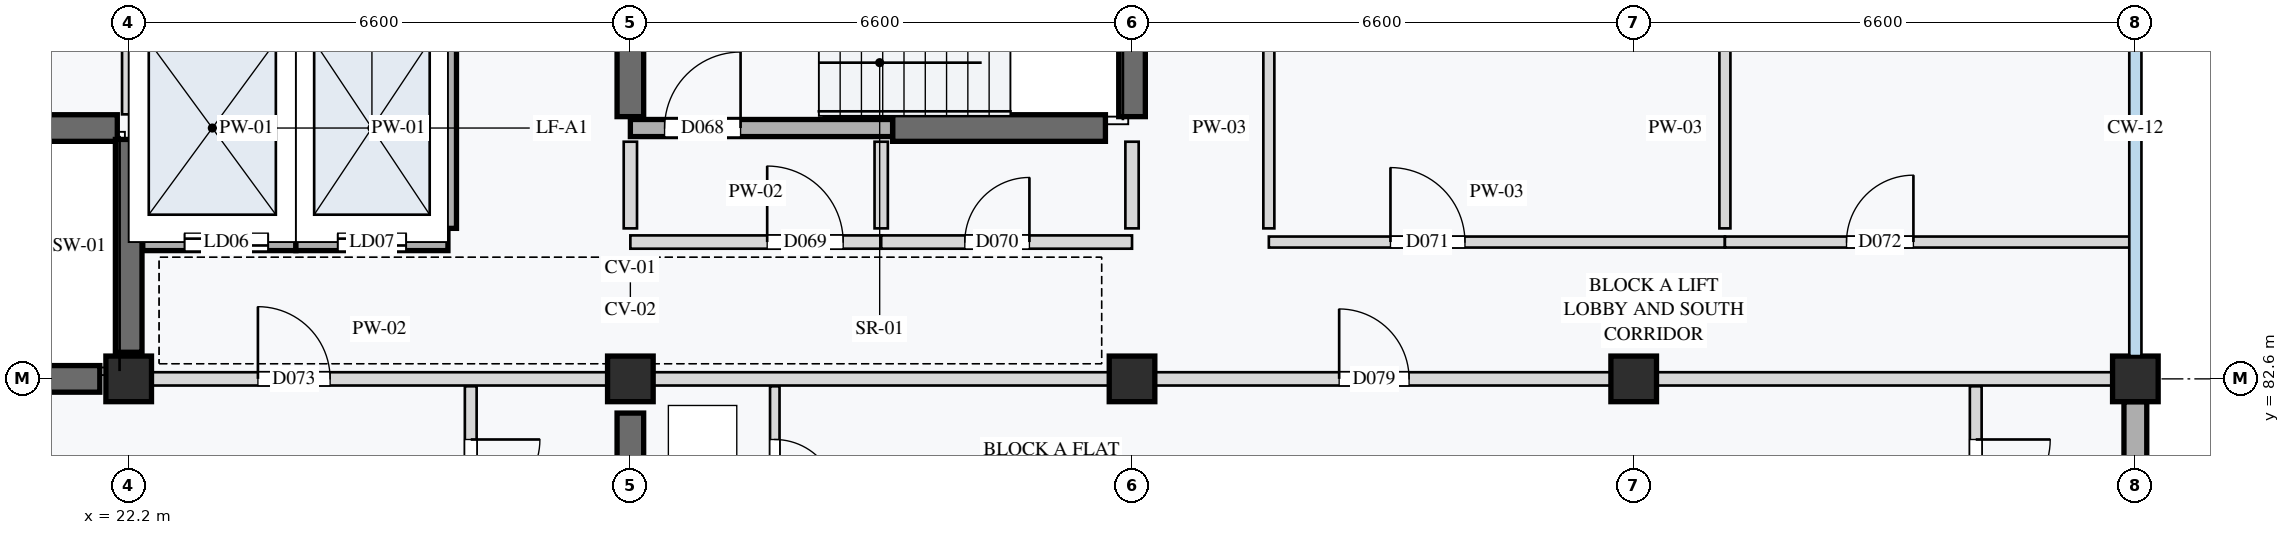
"""IFC4 building model, lengths in metres.
Left out: names, types, materials, properties, quantities, classifications, styles, units other than length and angle.
Written with IfcOpenShell. Run it as: python <this file> out.ifc"""

import sys

from ifc_helpers import new_model, si_unit, direction, frame, frame_2d, origin, origin_2d, place, context, subcontext, project, spatial, rectangle, extrude, element, fill, save


model = new_model("IFC4")
c1 = context("Model", 3, precision=1e-05, world=origin(), true_north=direction((0.0, 1.0)))
c2 = subcontext(c1, "Body", "Model", "MODEL_VIEW")
j1 = project(units=[si_unit("LENGTHUNIT", "METRE"), si_unit("PLANEANGLEUNIT", "RADIAN")], contexts=[c1])
p1 = place(None, origin())
s1 = spatial("IfcSite", under=j1, at=p1, CompositionType="ELEMENT")
p2 = place(p1, origin())
s2 = spatial("IfcBuilding", under=s1, at=p2, CompositionType="ELEMENT")
p3 = place(p2, frame((0.0, 0.0, 8.4)))
s3 = spatial("IfcBuildingStorey", under=s2, at=p3, CompositionType="ELEMENT", Elevation=8.4)
for number, where, z_axis, x_axis in (
    (1, (22.2, 82.6, 0.0), (0.0, 0.0, 1.0), (1.0, 0.0, 0.0)),
    (2, (28.8, 82.6, 0.0), (0.0, 0.0, 1.0), (1.0, 0.0, 0.0)),
    (3, (35.4, 82.6, 0.0), (0.0, 0.0, 1.0), (1.0, 0.0, 0.0)),
    (4, (42.0, 82.6, 0.0), (0.0, 0.0, 1.0), (1.0, 0.0, 0.0)),
    (5, (48.6, 82.6, 0.0), (0.0, 0.0, 1.0), (1.0, 0.0, 0.0)),
):
    element("IfcColumn", number, at=place(p3, frame(where, z_axis=z_axis, x_axis=x_axis)), inside=s3, PredefinedType="COLUMN", context=c2, shape_type="SweptSolid", body=[
        extrude(rectangle(XDim=0.6, YDim=0.6, at=origin_2d()), origin(), (0.0, 0.0, 1.0), 3.2),
    ])
p4 = place(p3, frame((15.98, 82.6, 0.0), z_axis=(0.0, 0.0, 1.0), x_axis=(1.0, 0.0, 0.0)))
e6 = element("IfcWall", 6, at=p4, inside=s3, PredefinedType="SHEAR", context=c2, shape_type="SweptSolid", body=[
    extrude(rectangle(XDim=5.84, YDim=0.35, at=frame_2d((2.92, 0.0))), origin(), (0.0, 0.0, 1.0), 2.96),
])
p5 = place(p3, frame((19.35, 85.9, 0.0), z_axis=(0.0, 0.0, 1.0), x_axis=(1.0, 0.0, 0.0)))
e7 = element("IfcWall", 7, at=p5, inside=s3, PredefinedType="SHEAR", context=c2, shape_type="SweptSolid", body=[
    extrude(rectangle(XDim=2.7, YDim=0.35, at=frame_2d((1.35, 0.0))), origin(), (0.0, 0.0, 1.0), 2.96),
])
for number, where, z_axis, x_axis in (
    (8, (22.2, 82.95, 0.0), (0.0, 0.0, 1.0), (0.0, 1.0, 0.0)),
    (9, (32.25, 85.9, 0.0), (0.0, 0.0, 1.0), (1.0, 0.0, 0.0)),
    (10, (28.8, 86.05, 0.0), (0.0, 0.0, 1.0), (0.0, 1.0, 0.0)),
    (11, (35.4, 86.05, 0.0), (0.0, 0.0, 1.0), (0.0, 1.0, 0.0)),
):
    element("IfcWall", number, at=place(p3, frame(where, z_axis=z_axis, x_axis=x_axis)), inside=s3, PredefinedType="SHEAR", context=c2, shape_type="SweptSolid", body=[
        extrude(rectangle(XDim=2.8, YDim=0.35, at=frame_2d((1.4, 0.0))), origin(), (0.0, 0.0, 1.0), 2.96),
    ])
p6 = place(p3, frame((28.8, 76.45, 0.0), z_axis=(0.0, 0.0, 1.0), x_axis=(0.0, 1.0, 0.0)))
e12 = element("IfcWall", 12, at=p6, inside=s3, PredefinedType="SHEAR", context=c2, shape_type="SweptSolid", body=[
    extrude(rectangle(XDim=5.7, YDim=0.35, at=frame_2d((2.85, 0.0))), origin(), (0.0, 0.0, 1.0), 2.96),
])
p7 = place(p3, frame((48.6, 76.375, 0.0), z_axis=(0.0, 0.0, 1.0), x_axis=(0.0, 1.0, 0.0)))
e13 = element("IfcWall", 13, at=p7, inside=s3, PredefinedType="STANDARD", context=c2, shape_type="SweptSolid", body=[
    extrude(rectangle(XDim=5.925, YDim=0.3, at=frame_2d((2.962, 0.0))), origin(), (0.0, 0.0, 1.0), 2.65),
])
p8 = place(p3, frame((22.2, 86.08, 0.0), z_axis=(0.0, 0.0, 1.0), x_axis=(0.0, 1.0, 0.0)))
e14 = element("IfcWall", 14, at=p8, inside=s3, PredefinedType="PARTITIONING", context=c2, shape_type="SweptSolid", body=[
    extrude(rectangle(XDim=1.19, YDim=0.175, at=frame_2d((0.595, 0.0))), origin(), (0.0, 0.0, 1.0), 2.96),
])
p9 = place(p3, frame((22.385, 84.4, 0.0), z_axis=(0.0, 0.0, 1.0), x_axis=(1.0, 0.0, 0.0)))
e15 = element("IfcWall", 15, at=p9, inside=s3, PredefinedType="STANDARD", context=c2, shape_type="SweptSolid", body=[
    extrude(rectangle(XDim=2.015, YDim=0.225, at=frame_2d((1.007, 0.0))), origin(), (0.0, 0.0, 1.0), 2.96),
])
p10 = place(p9, frame((0.55, 0.0, 0.0)))
e16 = element("IfcOpeningElement", 16, at=p10, cuts=e15, PredefinedType="OPENING", context=c2, shape_type="SweptSolid", body=[
    extrude(rectangle(XDim=1.1, YDim=2.1, at=frame_2d((0.55, 1.05))), frame((0.0, 0.123, 0.0), z_axis=(0.0, -1.0, 0.0), x_axis=(1.0, 0.0, 0.0)), (0.0, 0.0, 1.0), 0.245),
])
p11 = place(p3, frame((24.4, 84.4, 0.0), z_axis=(0.0, 0.0, 1.0), x_axis=(1.0, 0.0, 0.0)))
e17 = element("IfcWall", 17, at=p11, inside=s3, PredefinedType="STANDARD", context=c2, shape_type="SweptSolid", body=[
    extrude(rectangle(XDim=2.0, YDim=0.225, at=frame_2d((1.0, 0.0))), origin(), (0.0, 0.0, 1.0), 2.96),
])
p12 = place(p11, frame((0.55, 0.0, 0.0)))
e18 = element("IfcOpeningElement", 18, at=p12, cuts=e17, PredefinedType="OPENING", context=c2, shape_type="SweptSolid", body=[
    extrude(rectangle(XDim=0.9, YDim=2.1, at=frame_2d((0.45, 1.05))), frame((0.0, 0.123, 0.0), z_axis=(0.0, -1.0, 0.0), x_axis=(1.0, 0.0, 0.0)), (0.0, 0.0, 1.0), 0.245),
])
for number, where, z_axis, x_axis in (
    (19, (24.4, 84.58, 0.0), (0.0, 0.0, 1.0), (0.0, 1.0, 0.0)),
    (20, (26.4, 84.58, 0.0), (0.0, 0.0, 1.0), (0.0, 1.0, 0.0)),
):
    element("IfcWall", number, at=place(p3, frame(where, z_axis=z_axis, x_axis=x_axis)), inside=s3, PredefinedType="STANDARD", context=c2, shape_type="SweptSolid", body=[
        extrude(rectangle(XDim=2.64, YDim=0.225, at=frame_2d((1.32, 0.0))), origin(), (0.0, 0.0, 1.0), 2.96),
    ])
p13 = place(p3, frame((28.8, 85.9, 0.0), z_axis=(0.0, 0.0, 1.0), x_axis=(1.0, 0.0, 0.0)))
e21 = element("IfcWall", 21, at=p13, inside=s3, PredefinedType="STANDARD", context=c2, shape_type="SweptSolid", body=[
    extrude(rectangle(XDim=3.45, YDim=0.225, at=frame_2d((1.725, 0.0))), origin(), (0.0, 0.0, 1.0), 2.96),
])
p14 = place(p13, frame((0.45, 0.0, 0.0)))
e22 = element("IfcOpeningElement", 22, at=p14, cuts=e21, PredefinedType="OPENING", context=c2, shape_type="SweptSolid", body=[
    extrude(rectangle(XDim=1.0, YDim=2.1, at=frame_2d((0.5, 1.05))), frame((0.0, 0.123, 0.0), z_axis=(0.0, -1.0, 0.0), x_axis=(1.0, 0.0, 0.0)), (0.0, 0.0, 1.0), 0.245),
])
p15 = place(p3, frame((28.8, 84.4, 0.0), z_axis=(0.0, 0.0, 1.0), x_axis=(1.0, 0.0, 0.0)))
e23 = element("IfcWall", 23, at=p15, inside=s3, PredefinedType="PARTITIONING", context=c2, shape_type="SweptSolid", body=[
    extrude(rectangle(XDim=3.3, YDim=0.175, at=frame_2d((1.65, 0.0))), origin(), (0.0, 0.0, 1.0), 2.96),
])
p16 = place(p15, frame((1.8, 0.0, 0.0)))
e24 = element("IfcOpeningElement", 24, at=p16, cuts=e23, PredefinedType="OPENING", context=c2, shape_type="SweptSolid", body=[
    extrude(rectangle(XDim=1.0, YDim=2.16, at=frame_2d((0.5, 1.08))), frame((0.0, 0.097, 0.0), z_axis=(0.0, -1.0, 0.0), x_axis=(1.0, 0.0, 0.0)), (0.0, 0.0, 1.0), 0.195),
])
p17 = place(p3, frame((32.1, 84.4, 0.0), z_axis=(0.0, 0.0, 1.0), x_axis=(1.0, 0.0, 0.0)))
e25 = element("IfcWall", 25, at=p17, inside=s3, PredefinedType="PARTITIONING", context=c2, shape_type="SweptSolid", body=[
    extrude(rectangle(XDim=3.3, YDim=0.175, at=frame_2d((1.65, 0.0))), origin(), (0.0, 0.0, 1.0), 2.96),
])
p18 = place(p17, frame((1.1, 0.0, 0.0)))
e26 = element("IfcOpeningElement", 26, at=p18, cuts=e25, PredefinedType="OPENING", context=c2, shape_type="SweptSolid", body=[
    extrude(rectangle(XDim=0.85, YDim=2.0, at=frame_2d((0.425, 1.0))), frame((0.0, 0.097, 0.0), z_axis=(0.0, -1.0, 0.0), x_axis=(1.0, 0.0, 0.0)), (0.0, 0.0, 1.0), 0.195),
])
for number, where, z_axis, x_axis in (
    (27, (28.8, 84.58, 0.0), (0.0, 0.0, 1.0), (0.0, 1.0, 0.0)),
    (28, (32.1, 84.58, 0.0), (0.0, 0.0, 1.0), (0.0, 1.0, 0.0)),
    (29, (35.4, 84.58, 0.0), (0.0, 0.0, 1.0), (0.0, 1.0, 0.0)),
):
    element("IfcWall", number, at=place(p3, frame(where, z_axis=z_axis, x_axis=x_axis)), inside=s3, PredefinedType="PARTITIONING", context=c2, shape_type="SweptSolid", body=[
        extrude(rectangle(XDim=1.14, YDim=0.175, at=frame_2d((0.57, 0.0))), origin(), (0.0, 0.0, 1.0), 2.96),
    ])
p19 = place(p3, frame((37.2, 84.4, 0.0), z_axis=(0.0, 0.0, 1.0), x_axis=(1.0, 0.0, 0.0)))
e30 = element("IfcWall", 30, at=p19, inside=s3, PredefinedType="PARTITIONING", context=c2, shape_type="SweptSolid", body=[
    extrude(rectangle(XDim=6.0, YDim=0.145, at=frame_2d((3.0, 0.0))), origin(), (0.0, 0.0, 1.0), 2.96),
])
p20 = place(p19, frame((1.6, 0.0, 0.0)))
e31 = element("IfcOpeningElement", 31, at=p20, cuts=e30, PredefinedType="OPENING", context=c2, shape_type="SweptSolid", body=[
    extrude(rectangle(XDim=0.98, YDim=2.12, at=frame_2d((0.49, 1.06))), frame((0.0, 0.083, 0.0), z_axis=(0.0, -1.0, 0.0), x_axis=(1.0, 0.0, 0.0)), (0.0, 0.0, 1.0), 0.165),
])
p21 = place(p3, frame((43.2, 84.4, 0.0), z_axis=(0.0, 0.0, 1.0), x_axis=(1.0, 0.0, 0.0)))
e32 = element("IfcWall", 32, at=p21, inside=s3, PredefinedType="PARTITIONING", context=c2, shape_type="SweptSolid", body=[
    extrude(rectangle(XDim=5.4, YDim=0.145, at=frame_2d((2.7, 0.0))), origin(), (0.0, 0.0, 1.0), 2.96),
])
p22 = place(p21, frame((1.6, 0.0, 0.0)))
e33 = element("IfcOpeningElement", 33, at=p22, cuts=e32, PredefinedType="OPENING", context=c2, shape_type="SweptSolid", body=[
    extrude(rectangle(XDim=0.88, YDim=2.1, at=frame_2d((0.44, 1.05))), frame((0.0, 0.083, 0.0), z_axis=(0.0, -1.0, 0.0), x_axis=(1.0, 0.0, 0.0)), (0.0, 0.0, 1.0), 0.165),
])
for number, where, z_axis, x_axis in (
    (34, (43.2, 84.58, 0.0), (0.0, 0.0, 1.0), (0.0, 1.0, 0.0)),
    (35, (37.2, 84.58, 0.0), (0.0, 0.0, 1.0), (0.0, 1.0, 0.0)),
):
    element("IfcWall", number, at=place(p3, frame(where, z_axis=z_axis, x_axis=x_axis)), inside=s3, PredefinedType="PARTITIONING", context=c2, shape_type="SweptSolid", body=[
        extrude(rectangle(XDim=2.64, YDim=0.145, at=frame_2d((1.32, 0.0))), origin(), (0.0, 0.0, 1.0), 2.96),
    ])
p23 = place(p3, frame((22.2, 82.6, 0.0), z_axis=(0.0, 0.0, 1.0), x_axis=(1.0, 0.0, 0.0)))
e36 = element("IfcWall", 36, at=p23, inside=s3, PredefinedType="PARTITIONING", context=c2, shape_type="SweptSolid", body=[
    extrude(rectangle(XDim=6.6, YDim=0.175, at=frame_2d((3.3, 0.0))), origin(), (0.0, 0.0, 1.0), 2.55),
])
p24 = place(p23, frame((1.7, 0.0, 0.0)))
e37 = element("IfcOpeningElement", 37, at=p24, cuts=e36, PredefinedType="OPENING", context=c2, shape_type="SweptSolid", body=[
    extrude(rectangle(XDim=0.95, YDim=2.16, at=frame_2d((0.475, 1.08))), frame((0.0, 0.097, 0.0), z_axis=(0.0, -1.0, 0.0), x_axis=(1.0, 0.0, 0.0)), (0.0, 0.0, 1.0), 0.195),
])
p25 = place(p3, frame((26.7, 82.502, 0.0), z_axis=(0.0, 0.0, 1.0), x_axis=(0.0, -1.0, 0.0)))
e38 = element("IfcWall", 38, at=p25, inside=s3, PredefinedType="PARTITIONING", context=c2, shape_type="SweptSolid", body=[
    extrude(rectangle(XDim=2.302, YDim=0.155, at=frame_2d((1.151, 0.0))), origin(), (0.0, 0.0, 1.0), 2.96),
])
p26 = place(p25, frame((0.7, 0.0, 0.0)))
e39 = element("IfcOpeningElement", 39, at=p26, cuts=e38, PredefinedType="OPENING", context=c2, shape_type="SweptSolid", body=[
    extrude(rectangle(XDim=0.91, YDim=2.14, at=frame_2d((0.455, 1.07))), frame((0.0, 0.087, 0.0), z_axis=(0.0, -1.0, 0.0), x_axis=(1.0, 0.0, 0.0)), (0.0, 0.0, 1.0), 0.175),
])
p27 = place(p3, frame((28.8, 82.6, 0.0), z_axis=(0.0, 0.0, 1.0), x_axis=(1.0, 0.0, 0.0)))
e40 = element("IfcWall", 40, at=p27, inside=s3, PredefinedType="PARTITIONING", context=c2, shape_type="SweptSolid", body=[
    extrude(rectangle(XDim=19.8, YDim=0.175, at=frame_2d((9.9, 0.0))), origin(), (0.0, 0.0, 1.0), 2.55),
])
p28 = place(p27, frame((9.325, 0.0, 0.0)))
e41 = element("IfcOpeningElement", 41, at=p28, cuts=e40, PredefinedType="OPENING", context=c2, shape_type="SweptSolid", body=[
    extrude(rectangle(XDim=0.92, YDim=2.14, at=frame_2d((0.46, 1.07))), frame((0.0, 0.097, 0.0), z_axis=(0.0, -1.0, 0.0), x_axis=(1.0, 0.0, 0.0)), (0.0, 0.0, 1.0), 0.195),
])
p29 = place(p3, frame((30.7, 82.502, 0.0), z_axis=(0.0, 0.0, 1.0), x_axis=(0.0, -1.0, 0.0)))
e42 = element("IfcWall", 42, at=p29, inside=s3, PredefinedType="PARTITIONING", context=c2, shape_type="SweptSolid", body=[
    extrude(rectangle(XDim=2.302, YDim=0.125, at=frame_2d((1.151, 0.0))), origin(), (0.0, 0.0, 1.0), 2.96),
])
p30 = place(p29, frame((0.7, 0.0, 0.0)))
e43 = element("IfcOpeningElement", 43, at=p30, cuts=e42, PredefinedType="OPENING", context=c2, shape_type="SweptSolid", body=[
    extrude(rectangle(XDim=0.82, YDim=2.05, at=frame_2d((0.41, 1.025))), frame((0.0, 0.073, 0.0), z_axis=(0.0, -1.0, 0.0), x_axis=(1.0, 0.0, 0.0)), (0.0, 0.0, 1.0), 0.145),
])
p31 = place(p3, frame((46.5, 82.502, 0.0), z_axis=(0.0, 0.0, 1.0), x_axis=(0.0, -1.0, 0.0)))
e44 = element("IfcWall", 44, at=p31, inside=s3, PredefinedType="PARTITIONING", context=c2, shape_type="SweptSolid", body=[
    extrude(rectangle(XDim=2.302, YDim=0.155, at=frame_2d((1.151, 0.0))), origin(), (0.0, 0.0, 1.0), 2.96),
])
p32 = place(p31, frame((0.7, 0.0, 0.0)))
e45 = element("IfcOpeningElement", 45, at=p32, cuts=e44, PredefinedType="OPENING", context=c2, shape_type="SweptSolid", body=[
    extrude(rectangle(XDim=0.98, YDim=2.12, at=frame_2d((0.49, 1.06))), frame((0.0, 0.087, 0.0), z_axis=(0.0, -1.0, 0.0), x_axis=(1.0, 0.0, 0.0)), (0.0, 0.0, 1.0), 0.175),
])
p33 = place(p10, origin())
e46 = element("IfcDoor", 46, at=p33, inside=s3, OperationType="DOUBLE_DOOR_SLIDING", PredefinedType="DOOR", context=c2, shape_type="SweptSolid", body=[
    extrude(rectangle(XDim=1.1, YDim=2.1, at=frame_2d((0.55, 1.05))), frame((0.0, 0.025, 0.0), z_axis=(0.0, -1.0, 0.0), x_axis=(1.0, 0.0, 0.0)), (0.0, 0.0, 1.0), 0.05),
])
fill(e16, e46)
p34 = place(p12, origin())
e47 = element("IfcDoor", 47, at=p34, inside=s3, OperationType="DOUBLE_DOOR_SLIDING", PredefinedType="DOOR", context=c2, shape_type="SweptSolid", body=[
    extrude(rectangle(XDim=0.9, YDim=2.1, at=frame_2d((0.45, 1.05))), frame((0.0, 0.025, 0.0), z_axis=(0.0, -1.0, 0.0), x_axis=(1.0, 0.0, 0.0)), (0.0, 0.0, 1.0), 0.05),
])
fill(e18, e47)
p35 = place(p14, origin())
e48 = element("IfcDoor", 48, at=p35, inside=s3, OperationType="SINGLE_SWING_RIGHT", PredefinedType="DOOR", context=c2, shape_type="SweptSolid", body=[
    extrude(rectangle(XDim=1.0, YDim=2.1, at=frame_2d((0.5, 1.05))), frame((0.0, 0.025, 0.0), z_axis=(0.0, -1.0, 0.0), x_axis=(1.0, 0.0, 0.0)), (0.0, 0.0, 1.0), 0.05),
])
fill(e22, e48)
p36 = place(p16, origin())
e49 = element("IfcDoor", 49, at=p36, inside=s3, OperationType="SINGLE_SWING_LEFT", PredefinedType="DOOR", context=c2, shape_type="SweptSolid", body=[
    extrude(rectangle(XDim=1.0, YDim=2.16, at=frame_2d((0.5, 1.08))), frame((0.0, 0.025, 0.0), z_axis=(0.0, -1.0, 0.0), x_axis=(1.0, 0.0, 0.0)), (0.0, 0.0, 1.0), 0.05),
])
fill(e24, e49)
p37 = place(p18, origin())
e50 = element("IfcDoor", 50, at=p37, inside=s3, OperationType="SINGLE_SWING_RIGHT", PredefinedType="DOOR", context=c2, shape_type="SweptSolid", body=[
    extrude(rectangle(XDim=0.85, YDim=2.0, at=frame_2d((0.425, 1.0))), frame((0.0, 0.025, 0.0), z_axis=(0.0, -1.0, 0.0), x_axis=(1.0, 0.0, 0.0)), (0.0, 0.0, 1.0), 0.05),
])
fill(e26, e50)
p38 = place(p20, origin())
e51 = element("IfcDoor", 51, at=p38, inside=s3, OperationType="SINGLE_SWING_LEFT", PredefinedType="DOOR", context=c2, shape_type="SweptSolid", body=[
    extrude(rectangle(XDim=0.98, YDim=2.12, at=frame_2d((0.49, 1.06))), frame((0.0, 0.025, 0.0), z_axis=(0.0, -1.0, 0.0), x_axis=(1.0, 0.0, 0.0)), (0.0, 0.0, 1.0), 0.05),
])
fill(e31, e51)
p39 = place(p22, origin())
e52 = element("IfcDoor", 52, at=p39, inside=s3, OperationType="SINGLE_SWING_RIGHT", PredefinedType="DOOR", context=c2, shape_type="SweptSolid", body=[
    extrude(rectangle(XDim=0.88, YDim=2.1, at=frame_2d((0.44, 1.05))), frame((0.0, 0.025, 0.0), z_axis=(0.0, -1.0, 0.0), x_axis=(1.0, 0.0, 0.0)), (0.0, 0.0, 1.0), 0.05),
])
fill(e33, e52)
p40 = place(p24, origin())
e53 = element("IfcDoor", 53, at=p40, inside=s3, OperationType="SINGLE_SWING_LEFT", PredefinedType="DOOR", context=c2, shape_type="SweptSolid", body=[
    extrude(rectangle(XDim=0.95, YDim=2.16, at=frame_2d((0.475, 1.08))), frame((0.0, 0.025, 0.0), z_axis=(0.0, -1.0, 0.0), x_axis=(1.0, 0.0, 0.0)), (0.0, 0.0, 1.0), 0.05),
])
fill(e37, e53)
p41 = place(p26, origin())
e54 = element("IfcDoor", 54, at=p41, inside=s3, OperationType="SINGLE_SWING_LEFT", PredefinedType="DOOR", context=c2, shape_type="SweptSolid", body=[
    extrude(rectangle(XDim=0.91, YDim=2.14, at=frame_2d((0.455, 1.07))), frame((0.0, 0.025, 0.0), z_axis=(0.0, -1.0, 0.0), x_axis=(1.0, 0.0, 0.0)), (0.0, 0.0, 1.0), 0.05),
])
fill(e39, e54)
p42 = place(p28, origin())
e55 = element("IfcDoor", 55, at=p42, inside=s3, OperationType="SINGLE_SWING_LEFT", PredefinedType="DOOR", context=c2, shape_type="SweptSolid", body=[
    extrude(rectangle(XDim=0.92, YDim=2.14, at=frame_2d((0.46, 1.07))), frame((0.0, 0.025, 0.0), z_axis=(0.0, -1.0, 0.0), x_axis=(1.0, 0.0, 0.0)), (0.0, 0.0, 1.0), 0.05),
])
fill(e41, e55)
p43 = place(p30, origin())
e56 = element("IfcDoor", 56, at=p43, inside=s3, OperationType="SINGLE_SWING_RIGHT", PredefinedType="DOOR", context=c2, shape_type="SweptSolid", body=[
    extrude(rectangle(XDim=0.82, YDim=2.05, at=frame_2d((0.41, 1.025))), frame((0.0, 0.025, 0.0), z_axis=(0.0, -1.0, 0.0), x_axis=(1.0, 0.0, 0.0)), (0.0, 0.0, 1.0), 0.05),
])
fill(e43, e56)
p44 = place(p32, origin())
e57 = element("IfcDoor", 57, at=p44, inside=s3, OperationType="SINGLE_SWING_LEFT", PredefinedType="DOOR", context=c2, shape_type="SweptSolid", body=[
    extrude(rectangle(XDim=0.98, YDim=2.12, at=frame_2d((0.49, 1.06))), frame((0.0, 0.025, 0.0), z_axis=(0.0, -1.0, 0.0), x_axis=(1.0, 0.0, 0.0)), (0.0, 0.0, 1.0), 0.05),
])
fill(e45, e57)
save(model, sys.argv[1])
